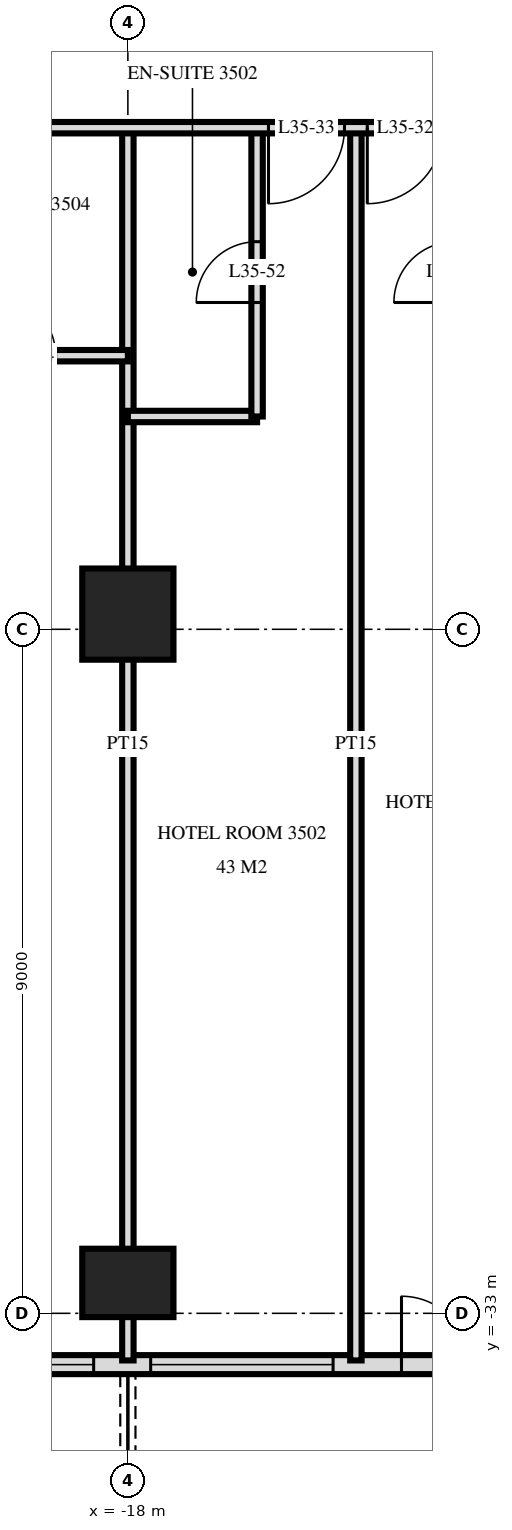
"""IFC4 building model, lengths in metres.
Left out: names, types, materials, properties, quantities, classifications, styles, units other than length and angle.
Written with IfcOpenShell. Run it as: python <this file> out.ifc"""

import sys

from ifc_helpers import new_model, si_unit, direction, frame, frame_2d, origin, origin_2d, place, context, subcontext, project, spatial, rectangle, extrude, element, fill, save


model = new_model("IFC4")
c1 = context("Model", 3, precision=1e-05, world=origin(), true_north=direction((0.0, 1.0)))
c2 = subcontext(c1, "Body", "Model", "MODEL_VIEW")
j1 = project(units=[si_unit("LENGTHUNIT", "METRE"), si_unit("PLANEANGLEUNIT", "RADIAN")], contexts=[c1])
p1 = place(None, origin())
s1 = spatial("IfcSite", under=j1, at=p1, CompositionType="ELEMENT")
p2 = place(p1, origin())
s2 = spatial("IfcBuilding", under=s1, at=p2, CompositionType="ELEMENT")
p3 = place(p2, frame((0.0, 0.0, 138.0)))
s3 = spatial("IfcBuildingStorey", under=s2, at=p3, CompositionType="ELEMENT", Elevation=138.0)
p4 = place(p3, frame((-18.0, -32.6, 0.0), z_axis=(0.0, 0.0, 1.0), x_axis=(1.0, 0.0, 0.0)))
e1 = element("IfcColumn", 1, at=p4, inside=s3, PredefinedType="COLUMN", context=c2, shape_type="SweptSolid", body=[
    extrude(rectangle(XDim=1.2, YDim=0.9, at=origin_2d()), origin(), (0.0, 0.0, 1.0), 3.6),
])
p5 = place(p3, frame((-18.0, -23.8, 0.0), z_axis=(0.0, 0.0, 1.0), x_axis=(1.0, 0.0, 0.0)))
e2 = element("IfcColumn", 2, at=p5, inside=s3, PredefinedType="COLUMN", context=c2, shape_type="SweptSolid", body=[
    extrude(rectangle(XDim=1.2, YDim=1.2, at=origin_2d()), origin(), (0.0, 0.0, 1.0), 3.6),
])
p6 = place(p3, frame((-23.675, -33.675, 0.0), z_axis=(0.0, 0.0, 1.0), x_axis=(1.0, 0.0, 0.0)))
e3 = element("IfcWall", 3, at=p6, inside=s3, PredefinedType="SOLIDWALL", context=c2, shape_type="SweptSolid", body=[
    extrude(rectangle(XDim=47.351, YDim=0.25, at=frame_2d((23.675, 0.0))), origin(), (0.0, 0.0, 1.0), 3.32),
])
p7 = place(p6, frame((0.575, 0.0, 0.0)))
e4 = element("IfcOpeningElement", 4, at=p7, cuts=e3, PredefinedType="OPENING", context=c2, shape_type="SweptSolid", body=[
    extrude(rectangle(XDim=1.8, YDim=2.4, at=frame_2d((0.9, 1.2))), frame((0.0, 0.135, 0.0), z_axis=(0.0, -1.0, 0.0), x_axis=(1.0, 0.0, 0.0)), (0.0, 0.0, 1.0), 0.27),
])
p8 = place(p6, frame((3.425, 0.0, 0.3)))
e5 = element("IfcOpeningElement", 5, at=p8, cuts=e3, PredefinedType="OPENING", context=c2, shape_type="SweptSolid", body=[
    extrude(rectangle(XDim=1.8, YDim=2.1, at=frame_2d((0.9, 1.05))), frame((0.0, 0.135, 0.0), z_axis=(0.0, -1.0, 0.0), x_axis=(1.0, 0.0, 0.0)), (0.0, 0.0, 1.0), 0.27),
])
p9 = place(p6, frame((5.975, 0.0, 0.3)))
e6 = element("IfcOpeningElement", 6, at=p9, cuts=e3, PredefinedType="OPENING", context=c2, shape_type="SweptSolid", body=[
    extrude(rectangle(XDim=2.4, YDim=2.1, at=frame_2d((1.2, 1.05))), frame((0.0, 0.135, 0.0), z_axis=(0.0, -1.0, 0.0), x_axis=(1.0, 0.0, 0.0)), (0.0, 0.0, 1.0), 0.27),
])
p10 = place(p6, frame((9.275, 0.0, 0.0)))
e7 = element("IfcOpeningElement", 7, at=p10, cuts=e3, PredefinedType="OPENING", context=c2, shape_type="SweptSolid", body=[
    extrude(rectangle(XDim=1.8, YDim=2.4, at=frame_2d((0.9, 1.2))), frame((0.0, 0.135, 0.0), z_axis=(0.0, -1.0, 0.0), x_axis=(1.0, 0.0, 0.0)), (0.0, 0.0, 1.0), 0.27),
])
p11 = place(p6, frame((12.275, 0.0, 0.0)))
e8 = element("IfcOpeningElement", 8, at=p11, cuts=e3, PredefinedType="OPENING", context=c2, shape_type="SweptSolid", body=[
    extrude(rectangle(XDim=1.8, YDim=2.4, at=frame_2d((0.9, 1.2))), frame((0.0, 0.135, 0.0), z_axis=(0.0, -1.0, 0.0), x_axis=(1.0, 0.0, 0.0)), (0.0, 0.0, 1.0), 0.27),
])
p12 = place(p6, frame((14.975, 0.0, 0.3)))
e9 = element("IfcOpeningElement", 9, at=p12, cuts=e3, PredefinedType="OPENING", context=c2, shape_type="SweptSolid", body=[
    extrude(rectangle(XDim=2.4, YDim=2.1, at=frame_2d((1.2, 1.05))), frame((0.0, 0.135, 0.0), z_axis=(0.0, -1.0, 0.0), x_axis=(1.0, 0.0, 0.0)), (0.0, 0.0, 1.0), 0.27),
])
p13 = place(p6, frame((17.975, 0.0, 0.3)))
e10 = element("IfcOpeningElement", 10, at=p13, cuts=e3, PredefinedType="OPENING", context=c2, shape_type="SweptSolid", body=[
    extrude(rectangle(XDim=2.4, YDim=2.1, at=frame_2d((1.2, 1.05))), frame((0.0, 0.135, 0.0), z_axis=(0.0, -1.0, 0.0), x_axis=(1.0, 0.0, 0.0)), (0.0, 0.0, 1.0), 0.27),
])
p14 = place(p6, frame((21.275, 0.0, 0.0)))
e11 = element("IfcOpeningElement", 11, at=p14, cuts=e3, PredefinedType="OPENING", context=c2, shape_type="SweptSolid", body=[
    extrude(rectangle(XDim=1.8, YDim=2.4, at=frame_2d((0.9, 1.2))), frame((0.0, 0.135, 0.0), z_axis=(0.0, -1.0, 0.0), x_axis=(1.0, 0.0, 0.0)), (0.0, 0.0, 1.0), 0.27),
])
p15 = place(p6, frame((24.275, 0.0, 0.0)))
e12 = element("IfcOpeningElement", 12, at=p15, cuts=e3, PredefinedType="OPENING", context=c2, shape_type="SweptSolid", body=[
    extrude(rectangle(XDim=1.8, YDim=2.4, at=frame_2d((0.9, 1.2))), frame((0.0, 0.135, 0.0), z_axis=(0.0, -1.0, 0.0), x_axis=(1.0, 0.0, 0.0)), (0.0, 0.0, 1.0), 0.27),
])
p16 = place(p6, frame((26.975, 0.0, 0.3)))
e13 = element("IfcOpeningElement", 13, at=p16, cuts=e3, PredefinedType="OPENING", context=c2, shape_type="SweptSolid", body=[
    extrude(rectangle(XDim=2.4, YDim=2.1, at=frame_2d((1.2, 1.05))), frame((0.0, 0.135, 0.0), z_axis=(0.0, -1.0, 0.0), x_axis=(1.0, 0.0, 0.0)), (0.0, 0.0, 1.0), 0.27),
])
p17 = place(p6, frame((30.275, 0.0, 0.0)))
e14 = element("IfcOpeningElement", 14, at=p17, cuts=e3, PredefinedType="OPENING", context=c2, shape_type="SweptSolid", body=[
    extrude(rectangle(XDim=1.8, YDim=2.4, at=frame_2d((0.9, 1.2))), frame((0.0, 0.135, 0.0), z_axis=(0.0, -1.0, 0.0), x_axis=(1.0, 0.0, 0.0)), (0.0, 0.0, 1.0), 0.27),
])
p18 = place(p6, frame((32.975, 0.0, 0.3)))
e15 = element("IfcOpeningElement", 15, at=p18, cuts=e3, PredefinedType="OPENING", context=c2, shape_type="SweptSolid", body=[
    extrude(rectangle(XDim=2.4, YDim=2.1, at=frame_2d((1.2, 1.05))), frame((0.0, 0.135, 0.0), z_axis=(0.0, -1.0, 0.0), x_axis=(1.0, 0.0, 0.0)), (0.0, 0.0, 1.0), 0.27),
])
p19 = place(p6, frame((36.275, 0.0, 0.0)))
e16 = element("IfcOpeningElement", 16, at=p19, cuts=e3, PredefinedType="OPENING", context=c2, shape_type="SweptSolid", body=[
    extrude(rectangle(XDim=1.8, YDim=2.4, at=frame_2d((0.9, 1.2))), frame((0.0, 0.135, 0.0), z_axis=(0.0, -1.0, 0.0), x_axis=(1.0, 0.0, 0.0)), (0.0, 0.0, 1.0), 0.27),
])
p20 = place(p6, frame((38.975, 0.0, 0.3)))
e17 = element("IfcOpeningElement", 17, at=p20, cuts=e3, PredefinedType="OPENING", context=c2, shape_type="SweptSolid", body=[
    extrude(rectangle(XDim=2.4, YDim=2.1, at=frame_2d((1.2, 1.05))), frame((0.0, 0.135, 0.0), z_axis=(0.0, -1.0, 0.0), x_axis=(1.0, 0.0, 0.0)), (0.0, 0.0, 1.0), 0.27),
])
p21 = place(p6, frame((42.275, 0.0, 0.0)))
e18 = element("IfcOpeningElement", 18, at=p21, cuts=e3, PredefinedType="OPENING", context=c2, shape_type="SweptSolid", body=[
    extrude(rectangle(XDim=1.8, YDim=2.4, at=frame_2d((0.9, 1.2))), frame((0.0, 0.135, 0.0), z_axis=(0.0, -1.0, 0.0), x_axis=(1.0, 0.0, 0.0)), (0.0, 0.0, 1.0), 0.27),
])
p22 = place(p6, frame((45.125, 0.0, 0.3)))
e19 = element("IfcOpeningElement", 19, at=p22, cuts=e3, PredefinedType="OPENING", context=c2, shape_type="SweptSolid", body=[
    extrude(rectangle(XDim=1.8, YDim=2.1, at=frame_2d((0.9, 1.05))), frame((0.0, 0.135, 0.0), z_axis=(0.0, -1.0, 0.0), x_axis=(1.0, 0.0, 0.0)), (0.0, 0.0, 1.0), 0.27),
])
p23 = place(p3, frame((-15.0, -33.62, 0.0), z_axis=(0.0, 0.0, 1.0), x_axis=(0.0, 1.0, 0.0)))
e20 = element("IfcWall", 20, at=p23, inside=s3, PredefinedType="PARTITIONING", context=c2, shape_type="SweptSolid", body=[
    extrude(rectangle(XDim=16.22, YDim=0.15, at=frame_2d((8.11, 0.0))), origin(), (0.0, 0.0, 1.0), 3.32),
])
p24 = place(p3, frame((-16.3, -21.2, 0.0), z_axis=(0.0, 0.0, 1.0), x_axis=(0.0, 1.0, 0.0)))
e21 = element("IfcWall", 21, at=p24, inside=s3, PredefinedType="PARTITIONING", context=c2, shape_type="SweptSolid", body=[
    extrude(rectangle(XDim=3.8, YDim=0.15, at=frame_2d((1.9, 0.0))), origin(), (0.0, 0.0, 1.0), 3.32),
])
p25 = place(p24, frame((1.5, 0.0, 0.0)))
e22 = element("IfcOpeningElement", 22, at=p25, cuts=e21, PredefinedType="OPENING", context=c2, shape_type="SweptSolid", body=[
    extrude(rectangle(XDim=0.8, YDim=2.1, at=frame_2d((0.4, 1.05))), frame((0.0, 0.085, 0.0), z_axis=(0.0, -1.0, 0.0), x_axis=(1.0, 0.0, 0.0)), (0.0, 0.0, 1.0), 0.17),
])
p26 = place(p3, frame((-18.0, -33.62, 0.0), z_axis=(0.0, 0.0, 1.0), x_axis=(0.0, 1.0, 0.0)))
e23 = element("IfcWall", 23, at=p26, inside=s3, PredefinedType="PARTITIONING", context=c2, shape_type="SweptSolid", body=[
    extrude(rectangle(XDim=16.22, YDim=0.15, at=frame_2d((8.11, 0.0))), origin(), (0.0, 0.0, 1.0), 3.32),
])
p27 = place(p3, frame((-18.0, -21.2, 0.0), z_axis=(0.0, 0.0, 1.0), x_axis=(1.0, 0.0, 0.0)))
e24 = element("IfcWall", 24, at=p27, inside=s3, PredefinedType="PARTITIONING", context=c2, shape_type="SweptSolid", body=[
    extrude(rectangle(XDim=1.7, YDim=0.15, at=frame_2d((0.85, 0.0))), origin(), (0.0, 0.0, 1.0), 3.32),
])
p28 = place(p3, frame((-22.2, -20.4, 0.0), z_axis=(0.0, 0.0, 1.0), x_axis=(1.0, 0.0, 0.0)))
e25 = element("IfcWall", 25, at=p28, inside=s3, PredefinedType="PARTITIONING", context=c2, shape_type="SweptSolid", body=[
    extrude(rectangle(XDim=4.2, YDim=0.15, at=frame_2d((2.1, 0.0))), origin(), (0.0, 0.0, 1.0), 3.32),
])
p29 = place(p28, frame((2.45, 0.0, 0.0)))
e26 = element("IfcOpeningElement", 26, at=p29, cuts=e25, PredefinedType="OPENING", context=c2, shape_type="SweptSolid", body=[
    extrude(rectangle(XDim=0.8, YDim=2.1, at=frame_2d((0.4, 1.05))), frame((0.0, 0.085, 0.0), z_axis=(0.0, -1.0, 0.0), x_axis=(1.0, 0.0, 0.0)), (0.0, 0.0, 1.0), 0.17),
])
p30 = place(p3, frame((-28.02, -17.4, 0.0), z_axis=(0.0, 0.0, 1.0), x_axis=(1.0, 0.0, 0.0)))
e27 = element("IfcWall", 27, at=p30, inside=s3, PredefinedType="PARTITIONING", context=c2, shape_type="SweptSolid", body=[
    extrude(rectangle(XDim=56.04, YDim=0.15, at=frame_2d((28.02, 0.0))), origin(), (0.0, 0.0, 1.0), 3.32),
])
p31 = place(p30, frame((13.17, 0.0, 0.0)))
e28 = element("IfcOpeningElement", 28, at=p31, cuts=e27, PredefinedType="OPENING", context=c2, shape_type="SweptSolid", body=[
    extrude(rectangle(XDim=1.0, YDim=2.1, at=frame_2d((0.5, 1.05))), frame((0.0, 0.085, 0.0), z_axis=(0.0, -1.0, 0.0), x_axis=(1.0, 0.0, 0.0)), (0.0, 0.0, 1.0), 0.17),
])
p32 = place(p30, frame((11.87, 0.0, 0.0)))
e29 = element("IfcOpeningElement", 29, at=p32, cuts=e27, PredefinedType="OPENING", context=c2, shape_type="SweptSolid", body=[
    extrude(rectangle(XDim=1.0, YDim=2.1, at=frame_2d((0.5, 1.05))), frame((0.0, 0.085, 0.0), z_axis=(0.0, -1.0, 0.0), x_axis=(1.0, 0.0, 0.0)), (0.0, 0.0, 1.0), 0.17),
])
p33 = place(p30, frame((2.32, 0.0, 0.0)))
e30 = element("IfcOpeningElement", 30, at=p33, cuts=e27, PredefinedType="OPENING", context=c2, shape_type="SweptSolid", body=[
    extrude(rectangle(XDim=1.0, YDim=2.1, at=frame_2d((0.5, 1.05))), frame((0.0, 0.085, 0.0), z_axis=(0.0, -1.0, 0.0), x_axis=(1.0, 0.0, 0.0)), (0.0, 0.0, 1.0), 0.17),
])
p34 = place(p30, frame((40.17, 0.0, 0.0)))
e31 = element("IfcOpeningElement", 31, at=p34, cuts=e27, PredefinedType="OPENING", context=c2, shape_type="SweptSolid", body=[
    extrude(rectangle(XDim=1.0, YDim=2.1, at=frame_2d((0.5, 1.05))), frame((0.0, 0.085, 0.0), z_axis=(0.0, -1.0, 0.0), x_axis=(1.0, 0.0, 0.0)), (0.0, 0.0, 1.0), 0.17),
])
p35 = place(p30, frame((51.22, 0.0, 0.0)))
e32 = element("IfcOpeningElement", 32, at=p35, cuts=e27, PredefinedType="OPENING", context=c2, shape_type="SweptSolid", body=[
    extrude(rectangle(XDim=1.0, YDim=2.1, at=frame_2d((0.5, 1.05))), frame((0.0, 0.085, 0.0), z_axis=(0.0, -1.0, 0.0), x_axis=(1.0, 0.0, 0.0)), (0.0, 0.0, 1.0), 0.17),
])
p36 = place(p30, frame((18.52, 0.0, 0.0)))
e33 = element("IfcOpeningElement", 33, at=p36, cuts=e27, PredefinedType="OPENING", context=c2, shape_type="SweptSolid", body=[
    extrude(rectangle(XDim=1.0, YDim=2.1, at=frame_2d((0.5, 1.05))), frame((0.0, 0.085, 0.0), z_axis=(0.0, -1.0, 0.0), x_axis=(1.0, 0.0, 0.0)), (0.0, 0.0, 1.0), 0.17),
])
p37 = place(p30, frame((26.02, 0.0, 0.0)))
e34 = element("IfcOpeningElement", 34, at=p37, cuts=e27, PredefinedType="OPENING", context=c2, shape_type="SweptSolid", body=[
    extrude(rectangle(XDim=1.0, YDim=2.1, at=frame_2d((0.5, 1.05))), frame((0.0, 0.085, 0.0), z_axis=(0.0, -1.0, 0.0), x_axis=(1.0, 0.0, 0.0)), (0.0, 0.0, 1.0), 0.17),
])
p38 = place(p30, frame((35.02, 0.0, 0.0)))
e35 = element("IfcOpeningElement", 35, at=p38, cuts=e27, PredefinedType="OPENING", context=c2, shape_type="SweptSolid", body=[
    extrude(rectangle(XDim=1.0, YDim=2.1, at=frame_2d((0.5, 1.05))), frame((0.0, 0.085, 0.0), z_axis=(0.0, -1.0, 0.0), x_axis=(1.0, 0.0, 0.0)), (0.0, 0.0, 1.0), 0.17),
])
p39 = place(p8, origin())
e36 = element("IfcWindow", 36, at=p39, inside=s3, PartitioningType="SINGLE_PANEL", PredefinedType="WINDOW", context=c2, shape_type="SweptSolid", body=[
    extrude(rectangle(XDim=1.8, YDim=2.1, at=frame_2d((0.9, 1.05))), frame((0.0, 0.03, 0.0), z_axis=(0.0, -1.0, 0.0), x_axis=(1.0, 0.0, 0.0)), (0.0, 0.0, 1.0), 0.06),
])
fill(e5, e36)
p40 = place(p9, origin())
e37 = element("IfcWindow", 37, at=p40, inside=s3, PartitioningType="SINGLE_PANEL", PredefinedType="WINDOW", context=c2, shape_type="SweptSolid", body=[
    extrude(rectangle(XDim=2.4, YDim=2.1, at=frame_2d((1.2, 1.05))), frame((0.0, 0.03, 0.0), z_axis=(0.0, -1.0, 0.0), x_axis=(1.0, 0.0, 0.0)), (0.0, 0.0, 1.0), 0.06),
])
fill(e6, e37)
p41 = place(p10, origin())
e38 = element("IfcDoor", 38, at=p41, inside=s3, OperationType="DOUBLE_DOOR_SINGLE_SWING", PredefinedType="DOOR", context=c2, shape_type="SweptSolid", body=[
    extrude(rectangle(XDim=1.8, YDim=2.4, at=frame_2d((0.9, 1.2))), frame((0.0, 0.025, 0.0), z_axis=(0.0, -1.0, 0.0), x_axis=(1.0, 0.0, 0.0)), (0.0, 0.0, 1.0), 0.05),
])
fill(e7, e38)
p42 = place(p31, frame((0.5, 0.0, 0.0), z_axis=(0.0, 0.0, 1.0), x_axis=(-1.0, 0.0, 0.0)))
e39 = element("IfcDoor", 39, at=p42, inside=s3, OperationType="SINGLE_SWING_LEFT", PredefinedType="DOOR", context=c2, shape_type="SweptSolid", body=[
    extrude(rectangle(XDim=1.0, YDim=2.1, at=frame_2d((0.0, 1.05))), frame((0.0, -0.025, 0.0), z_axis=(0.0, 1.0, 0.0), x_axis=(-1.0, 0.0, 0.0)), (0.0, 0.0, 1.0), 0.05),
])
fill(e28, e39)
p43 = place(p32, frame((0.5, 0.0, 0.0), z_axis=(0.0, 0.0, 1.0), x_axis=(-1.0, 0.0, 0.0)))
e40 = element("IfcDoor", 40, at=p43, inside=s3, OperationType="SINGLE_SWING_LEFT", PredefinedType="DOOR", context=c2, shape_type="SweptSolid", body=[
    extrude(rectangle(XDim=1.0, YDim=2.1, at=frame_2d((0.0, 1.05))), frame((0.0, -0.025, 0.0), z_axis=(0.0, 1.0, 0.0), x_axis=(-1.0, 0.0, 0.0)), (0.0, 0.0, 1.0), 0.05),
])
fill(e29, e40)
p44 = place(p25, origin())
e41 = element("IfcDoor", 41, at=p44, inside=s3, OperationType="SINGLE_SWING_RIGHT", PredefinedType="DOOR", context=c2, shape_type="SweptSolid", body=[
    extrude(rectangle(XDim=0.8, YDim=2.1, at=frame_2d((0.4, 1.05))), frame((0.0, 0.025, 0.0), z_axis=(0.0, -1.0, 0.0), x_axis=(1.0, 0.0, 0.0)), (0.0, 0.0, 1.0), 0.05),
])
fill(e22, e41)
p45 = place(p29, origin())
e42 = element("IfcDoor", 42, at=p45, inside=s3, OperationType="SINGLE_SWING_RIGHT", PredefinedType="DOOR", context=c2, shape_type="SweptSolid", body=[
    extrude(rectangle(XDim=0.8, YDim=2.1, at=frame_2d((0.4, 1.05))), frame((0.0, 0.025, 0.0), z_axis=(0.0, -1.0, 0.0), x_axis=(1.0, 0.0, 0.0)), (0.0, 0.0, 1.0), 0.05),
])
fill(e26, e42)
save(model, sys.argv[1])
